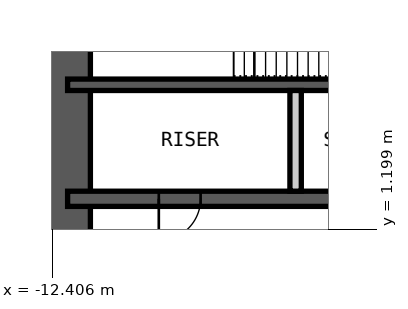
"""IFC4 building model, lengths in metres.
Left out: names, types, materials, properties, quantities, classifications, styles, units other than length and angle.
Written with IfcOpenShell. Run it as: python <this file> out.ifc"""

import sys

from ifc_helpers import new_model, si_unit, direction, frame, frame_2d, origin, place, context, subcontext, project, spatial, rectangle, extrude, element, fill, save


model = new_model("IFC4")
c1 = context("Model", 3, precision=1e-05, world=origin(), true_north=direction((0.0, 1.0)))
c2 = subcontext(c1, "Body", "Model", "MODEL_VIEW")
j1 = project(units=[si_unit("LENGTHUNIT", "METRE"), si_unit("PLANEANGLEUNIT", "RADIAN")], contexts=[c1])
p1 = place(None, origin())
s1 = spatial("IfcSite", under=j1, at=p1, CompositionType="ELEMENT")
p2 = place(p1, origin())
s2 = spatial("IfcBuilding", under=s1, at=p2, CompositionType="ELEMENT")
p3 = place(p2, frame((0.0, 0.0, 218.2)))
s3 = spatial("IfcBuildingStorey", under=s2, at=p3, CompositionType="ELEMENT", Elevation=218.2)
p4 = place(p3, frame((-12.0, -9.0, 0.0), z_axis=(0.0, 0.0, 1.0), x_axis=(0.0, 1.0, 0.0)))
e1 = element("IfcWall", 1, at=p4, inside=s3, PredefinedType="SHEAR", context=c2, shape_type="SweptSolid", body=[
    extrude(rectangle(XDim=18.0, YDim=1.2, at=frame_2d((9.0, 0.0))), origin(), (0.0, 0.0, 1.0), 4.2),
])
p5 = place(p4, frame((8.1, 0.0, 0.0)))
e2 = element("IfcOpeningElement", 2, at=p5, cuts=e1, PredefinedType="OPENING", context=c2, shape_type="SweptSolid", body=[
    extrude(rectangle(XDim=1.8, YDim=2.1, at=frame_2d((0.9, 1.05))), frame((0.0, 0.61, 0.0), z_axis=(0.0, -1.0, 0.0), x_axis=(1.0, 0.0, 0.0)), (0.0, 0.0, 1.0), 1.22),
])
p6 = place(p3, frame((-12.0, 5.0, 0.0), z_axis=(0.0, 0.0, 1.0), x_axis=(1.0, 0.0, 0.0)))
e3 = element("IfcWall", 3, at=p6, inside=s3, PredefinedType="SHEAR", context=c2, shape_type="SweptSolid", body=[
    extrude(rectangle(XDim=24.0, YDim=0.3, at=frame_2d((12.0, 0.0))), origin(), (0.0, 0.0, 1.0), 4.2),
])
p7 = place(p3, frame((-12.0, 2.0, 0.0), z_axis=(0.0, 0.0, 1.0), x_axis=(1.0, 0.0, 0.0)))
e4 = element("IfcWall", 4, at=p7, inside=s3, PredefinedType="SHEAR", context=c2, shape_type="SweptSolid", body=[
    extrude(rectangle(XDim=24.0, YDim=0.4, at=frame_2d((12.0, 0.0))), origin(), (0.0, 0.0, 1.0), 4.2),
])
p8 = place(p7, frame((2.4, 0.0, 0.0)))
e5 = element("IfcOpeningElement", 5, at=p8, cuts=e4, PredefinedType="OPENING", context=c2, shape_type="SweptSolid", body=[
    extrude(rectangle(XDim=1.1, YDim=2.1, at=frame_2d((0.55, 1.05))), frame((0.0, 0.21, 0.0), z_axis=(0.0, -1.0, 0.0), x_axis=(1.0, 0.0, 0.0)), (0.0, 0.0, 1.0), 0.42),
])
p9 = place(p7, frame((22.0, 0.0, 0.0)))
e6 = element("IfcOpeningElement", 6, at=p9, cuts=e4, PredefinedType="OPENING", context=c2, shape_type="SweptSolid", body=[
    extrude(rectangle(XDim=1.1, YDim=2.1, at=frame_2d((0.55, 1.05))), frame((0.0, 0.21, 0.0), z_axis=(0.0, -1.0, 0.0), x_axis=(1.0, 0.0, 0.0)), (0.0, 0.0, 1.0), 0.42),
])
p10 = place(p7, frame((10.15, 0.0, 0.0)))
e7 = element("IfcOpeningElement", 7, at=p10, cuts=e4, PredefinedType="OPENING", context=c2, shape_type="SweptSolid", body=[
    extrude(rectangle(XDim=1.0, YDim=2.1, at=frame_2d((0.5, 1.05))), frame((0.0, 0.21, 0.0), z_axis=(0.0, -1.0, 0.0), x_axis=(1.0, 0.0, 0.0)), (0.0, 0.0, 1.0), 0.42),
])
p11 = place(p7, frame((6.9, 0.0, 0.0)))
e8 = element("IfcOpeningElement", 8, at=p11, cuts=e4, PredefinedType="OPENING", context=c2, shape_type="SweptSolid", body=[
    extrude(rectangle(XDim=1.0, YDim=2.1, at=frame_2d((0.5, 1.05))), frame((0.0, 0.21, 0.0), z_axis=(0.0, -1.0, 0.0), x_axis=(1.0, 0.0, 0.0)), (0.0, 0.0, 1.0), 0.42),
])
p12 = place(p7, frame((13.35, 0.0, 0.0)))
e9 = element("IfcOpeningElement", 9, at=p12, cuts=e4, PredefinedType="OPENING", context=c2, shape_type="SweptSolid", body=[
    extrude(rectangle(XDim=1.1, YDim=2.4, at=frame_2d((0.55, 1.2))), frame((0.0, 0.21, 0.0), z_axis=(0.0, -1.0, 0.0), x_axis=(1.0, 0.0, 0.0)), (0.0, 0.0, 1.0), 0.42),
])
p13 = place(p7, frame((16.15, 0.0, 0.0)))
e10 = element("IfcOpeningElement", 10, at=p13, cuts=e4, PredefinedType="OPENING", context=c2, shape_type="SweptSolid", body=[
    extrude(rectangle(XDim=1.1, YDim=2.4, at=frame_2d((0.55, 1.2))), frame((0.0, 0.21, 0.0), z_axis=(0.0, -1.0, 0.0), x_axis=(1.0, 0.0, 0.0)), (0.0, 0.0, 1.0), 0.42),
])
p14 = place(p7, frame((18.95, 0.0, 0.0)))
e11 = element("IfcOpeningElement", 11, at=p14, cuts=e4, PredefinedType="OPENING", context=c2, shape_type="SweptSolid", body=[
    extrude(rectangle(XDim=1.1, YDim=2.4, at=frame_2d((0.55, 1.2))), frame((0.0, 0.21, 0.0), z_axis=(0.0, -1.0, 0.0), x_axis=(1.0, 0.0, 0.0)), (0.0, 0.0, 1.0), 0.42),
])
p15 = place(p3, frame((-6.0, 2.2, 0.0), z_axis=(0.0, 0.0, 1.0), x_axis=(0.0, 1.0, 0.0)))
e12 = element("IfcWall", 12, at=p15, inside=s3, PredefinedType="PARTITIONING", context=c2, shape_type="SweptSolid", body=[
    extrude(rectangle(XDim=2.65, YDim=0.3, at=frame_2d((1.325, 0.0))), origin(), (0.0, 0.0, 1.0), 3.98),
])
p16 = place(p8, origin())
e13 = element("IfcDoor", 13, at=p16, inside=s3, OperationType="SINGLE_SWING_LEFT", PredefinedType="DOOR", context=c2, shape_type="SweptSolid", body=[
    extrude(rectangle(XDim=1.1, YDim=2.1, at=frame_2d((0.55, 1.05))), frame((0.0, 0.025, 0.0), z_axis=(0.0, -1.0, 0.0), x_axis=(1.0, 0.0, 0.0)), (0.0, 0.0, 1.0), 0.05),
])
fill(e5, e13)
save(model, sys.argv[1])
